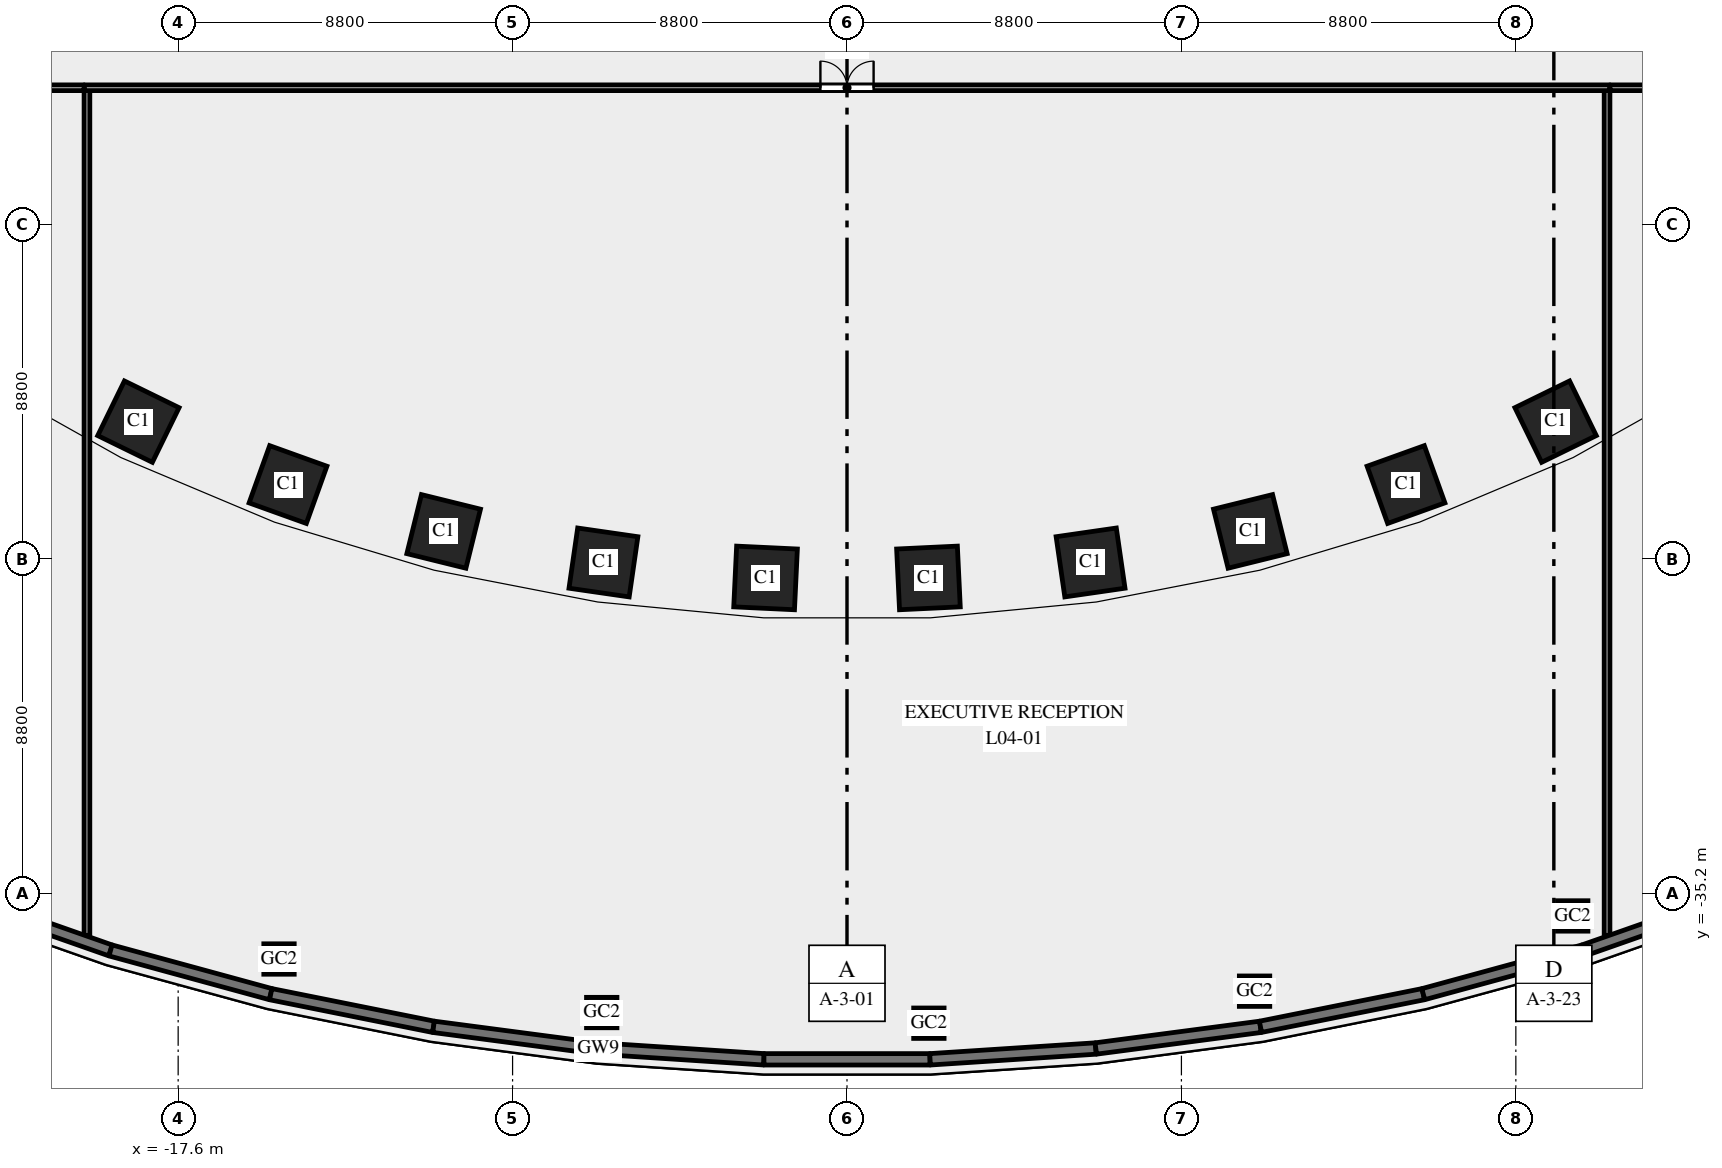
"""IFC4 building model, lengths in metres.
Left out: names, types, materials, properties, quantities, classifications, styles, units other than length and angle.
Written with IfcOpenShell. Run it as: python <this file> out.ifc"""

import sys

from ifc_helpers import new_model, si_unit, direction, frame, frame_2d, origin, origin_2d, place, context, subcontext, project, spatial, rectangle, hollow_rectangle, extrude, element, fill, save


model = new_model("IFC4")
c1 = context("Model", 3, precision=1e-05, world=origin(), true_north=direction((0.0, 1.0)))
c2 = subcontext(c1, "Body", "Model", "MODEL_VIEW")
j1 = project(units=[si_unit("LENGTHUNIT", "METRE"), si_unit("PLANEANGLEUNIT", "RADIAN")], contexts=[c1])
p1 = place(None, origin())
s1 = spatial("IfcSite", under=j1, at=p1, CompositionType="ELEMENT")
p2 = place(p1, origin())
s2 = spatial("IfcBuilding", under=s1, at=p2, CompositionType="ELEMENT")
p3 = place(p2, frame((0.0, 0.0, 25.0)))
s3 = spatial("IfcBuildingStorey", under=s2, at=p3, CompositionType="ELEMENT", Elevation=25.0)
for number, where, z_axis, x_axis in (
    (1, (-18.646, -22.785, 0.0), (0.0, 0.0, 1.0), (0.898, -0.439, 0.0)),
    (2, (-14.709, -24.441, 0.0), (0.0, 0.0, 1.0), (0.941, -0.338, 0.0)),
    (3, (-10.613, -25.674, 0.0), (0.0, 0.0, 1.0), (0.971, -0.24, 0.0)),
    (4, (-6.409, -26.491, 0.0), (0.0, 0.0, 1.0), (0.99, -0.143, 0.0)),
    (5, (-2.143, -26.898, 0.0), (0.0, 0.0, 1.0), (0.999, -0.048, 0.0)),
    (6, (2.143, -26.898, 0.0), (0.0, 0.0, 1.0), (0.999, 0.048, 0.0)),
    (7, (6.409, -26.491, 0.0), (0.0, 0.0, 1.0), (0.99, 0.143, 0.0)),
    (8, (10.613, -25.674, 0.0), (0.0, 0.0, 1.0), (0.971, 0.24, 0.0)),
    (9, (14.709, -24.441, 0.0), (0.0, 0.0, 1.0), (0.941, 0.338, 0.0)),
    (10, (18.646, -22.785, 0.0), (0.0, 0.0, 1.0), (0.898, 0.439, 0.0)),
):
    element("IfcColumn", number, at=place(p3, frame(where, z_axis=z_axis, x_axis=x_axis)), inside=s3, PredefinedType="COLUMN", context=c2, shape_type="SweptSolid", body=[
        extrude(rectangle(XDim=1.6, YDim=1.6, at=origin_2d()), origin(), (0.0, 0.0, 1.0), 5.5),
    ])
for number, where, z_axis, x_axis in (
    (11, (-14.946, -36.925, 0.0), (0.0, 0.0, 1.0), (1.0, 0.0, 0.0)),
    (12, (-6.454, -38.333, 0.0), (0.0, 0.0, 1.0), (1.0, 0.0, 0.0)),
    (13, (2.155, -38.614, 0.0), (0.0, 0.0, 1.0), (1.0, 0.0, 0.0)),
    (14, (10.725, -37.771, 0.0), (0.0, 0.0, 1.0), (1.0, 0.0, 0.0)),
    (15, (19.097, -35.792, 0.0), (0.0, 0.0, 1.0), (1.0, 0.0, 0.0)),
):
    element("IfcColumn", number, at=place(p3, frame(where, z_axis=z_axis, x_axis=x_axis)), inside=s3, PredefinedType="COLUMN", context=c2, shape_type="SweptSolid", body=[
        extrude(hollow_rectangle(XDim=0.8, YDim=0.8, WallThickness=0.04, at=origin_2d()), origin(), (0.0, 0.0, 1.0), 5.488),
    ])
p4 = place(p3, frame((20.0, -14.075, 0.0), z_axis=(0.0, 0.0, 1.0), x_axis=(0.0, -1.0, 0.0)))
e16 = element("IfcWall", 16, at=p4, inside=s3, PredefinedType="PARTITIONING", context=c2, shape_type="SweptSolid", body=[
    extrude(rectangle(XDim=22.228, YDim=0.15, at=frame_2d((11.114, 0.0))), origin(), (0.0, 0.0, 1.0), 4.2),
])
p5 = place(p3, frame((-20.0, -36.302, 0.0), z_axis=(0.0, 0.0, 1.0), x_axis=(0.0, 1.0, 0.0)))
e17 = element("IfcWall", 17, at=p5, inside=s3, PredefinedType="PARTITIONING", context=c2, shape_type="SweptSolid", body=[
    extrude(rectangle(XDim=22.228, YDim=0.15, at=frame_2d((11.114, 0.0))), origin(), (0.0, 0.0, 1.0), 4.15),
])
p6 = place(p3, frame((-20.075, -14.0, 0.0), z_axis=(0.0, 0.0, 1.0), x_axis=(1.0, 0.0, 0.0)))
e18 = element("IfcWall", 18, at=p6, inside=s3, PredefinedType="PARTITIONING", context=c2, shape_type="SweptSolid", body=[
    extrude(rectangle(XDim=40.15, YDim=0.15, at=frame_2d((20.075, 0.0))), origin(), (0.0, 0.0, 1.0), 4.15),
])
p7 = place(p6, frame((19.375, 0.0, 0.0)))
e19 = element("IfcOpeningElement", 19, at=p7, cuts=e18, PredefinedType="OPENING", context=c2, shape_type="SweptSolid", body=[
    extrude(rectangle(XDim=1.4, YDim=2.1, at=frame_2d((0.7, 1.05))), frame((0.0, 0.085, 0.0), z_axis=(0.0, -1.0, 0.0), x_axis=(1.0, 0.0, 0.0)), (0.0, 0.0, 1.0), 0.17),
])
p8 = place(p3, frame((20.075, -14.0, 0.0), z_axis=(0.0, 0.0, 1.0), x_axis=(1.0, 0.0, 0.0)))
e20 = element("IfcWall", 20, at=p8, inside=s3, PredefinedType="PARTITIONING", context=c2, shape_type="SweptSolid", body=[
    extrude(rectangle(XDim=13.85, YDim=0.15, at=frame_2d((6.925, 0.0))), origin(), (0.0, 0.0, 1.0), 4.15),
])
p9 = place(p3, frame((-47.997, -14.0, 0.0), z_axis=(0.0, 0.0, 1.0), x_axis=(1.0, 0.0, 0.0)))
e21 = element("IfcWall", 21, at=p9, inside=s3, PredefinedType="PARTITIONING", context=c2, shape_type="SweptSolid", body=[
    extrude(rectangle(XDim=27.923, YDim=0.15, at=frame_2d((13.961, 0.0))), origin(), (0.0, 0.0, 1.0), 4.2),
])
p10 = place(p9, frame((13.462, 0.0, 0.0)))
e22 = element("IfcOpeningElement", 22, at=p10, cuts=e21, PredefinedType="OPENING", context=c2, shape_type="SweptSolid", body=[
    extrude(rectangle(XDim=1.0, YDim=2.1, at=frame_2d((0.5, 1.05))), frame((0.0, 0.085, 0.0), z_axis=(0.0, -1.0, 0.0), x_axis=(1.0, 0.0, 0.0)), (0.0, 0.0, 1.0), 0.17),
])
p11 = place(p3, frame((-23.5, -35.252, 0.0), z_axis=(0.0, 0.0, 1.0), x_axis=(0.943526738033, -0.331296384853, 0.0)))
e23 = element("IfcWall", 23, at=p11, inside=s3, PredefinedType="SOLIDWALL", context=c2, shape_type="SweptSolid", body=[
    extrude(rectangle(XDim=4.368, YDim=0.3, at=frame_2d((2.184, 0.0))), origin(), (0.0, 0.0, 1.0), 5.2),
])
p12 = place(p11, frame((0.984, 0.0, 1.0)))
e24 = element("IfcOpeningElement", 24, at=p12, cuts=e23, PredefinedType="OPENING", context=c2, shape_type="SweptSolid", body=[
    extrude(rectangle(XDim=2.4, YDim=3.0, at=frame_2d((1.2, 1.5))), frame((0.0, 0.16, 0.0), z_axis=(0.0, -1.0, 0.0), x_axis=(1.0, 0.0, 0.0)), (0.0, 0.0, 1.0), 0.32),
])
p13 = place(p3, frame((-19.379, -36.699, 0.0), z_axis=(0.0, 0.0, 1.0), x_axis=(0.964679950239, -0.263424739931, 0.0)))
e25 = element("IfcWall", 25, at=p13, inside=s3, PredefinedType="SOLIDWALL", context=c2, shape_type="SweptSolid", body=[
    extrude(rectangle(XDim=4.369, YDim=0.3, at=frame_2d((2.185, 0.0))), origin(), (0.0, 0.0, 1.0), 5.2),
])
p14 = place(p13, frame((0.985, 0.0, 1.0)))
e26 = element("IfcOpeningElement", 26, at=p14, cuts=e25, PredefinedType="OPENING", context=c2, shape_type="SweptSolid", body=[
    extrude(rectangle(XDim=2.4, YDim=3.0, at=frame_2d((1.2, 1.5))), frame((0.0, 0.16, 0.0), z_axis=(0.0, -1.0, 0.0), x_axis=(1.0, 0.0, 0.0)), (0.0, 0.0, 1.0), 0.32),
])
p15 = place(p3, frame((-15.165, -37.85, 0.0), z_axis=(0.0, 0.0, 1.0), x_axis=(0.980494629762, -0.196545875071, 0.0)))
e27 = element("IfcWall", 27, at=p15, inside=s3, PredefinedType="SOLIDWALL", context=c2, shape_type="SweptSolid", body=[
    extrude(rectangle(XDim=4.37, YDim=0.3, at=frame_2d((2.185, 0.0))), origin(), (0.0, 0.0, 1.0), 5.2),
])
p16 = place(p15, frame((0.985, 0.0, 1.0)))
e28 = element("IfcOpeningElement", 28, at=p16, cuts=e27, PredefinedType="OPENING", context=c2, shape_type="SweptSolid", body=[
    extrude(rectangle(XDim=2.4, YDim=3.0, at=frame_2d((1.2, 1.5))), frame((0.0, 0.16, 0.0), z_axis=(0.0, -1.0, 0.0), x_axis=(1.0, 0.0, 0.0)), (0.0, 0.0, 1.0), 0.32),
])
p17 = place(p3, frame((-10.88, -38.709, 0.0), z_axis=(0.0, 0.0, 1.0), x_axis=(0.991441741932, -0.130549884544, 0.0)))
e29 = element("IfcWall", 29, at=p17, inside=s3, PredefinedType="SOLIDWALL", context=c2, shape_type="SweptSolid", body=[
    extrude(rectangle(XDim=4.37, YDim=0.3, at=frame_2d((2.185, 0.0))), origin(), (0.0, 0.0, 1.0), 5.2),
])
p18 = place(p17, frame((0.985, 0.0, 1.0)))
e30 = element("IfcOpeningElement", 30, at=p18, cuts=e29, PredefinedType="OPENING", context=c2, shape_type="SweptSolid", body=[
    extrude(rectangle(XDim=2.4, YDim=3.0, at=frame_2d((1.2, 1.5))), frame((0.0, 0.16, 0.0), z_axis=(0.0, -1.0, 0.0), x_axis=(1.0, 0.0, 0.0)), (0.0, 0.0, 1.0), 0.32),
])
p19 = place(p3, frame((-6.547, -39.28, 0.0), z_axis=(0.0, 0.0, 1.0), x_axis=(0.997876871627, -0.065128711577, 0.0)))
e31 = element("IfcWall", 31, at=p19, inside=s3, PredefinedType="SOLIDWALL", context=c2, shape_type="SweptSolid", body=[
    extrude(rectangle(XDim=4.371, YDim=0.3, at=frame_2d((2.186, 0.0))), origin(), (0.0, 0.0, 1.0), 5.2),
])
p20 = place(p19, frame((0.985, 0.0, 1.0)))
e32 = element("IfcOpeningElement", 32, at=p20, cuts=e31, PredefinedType="OPENING", context=c2, shape_type="SweptSolid", body=[
    extrude(rectangle(XDim=2.4, YDim=3.0, at=frame_2d((1.2, 1.5))), frame((0.0, 0.16, 0.0), z_axis=(0.0, -1.0, 0.0), x_axis=(1.0, 0.0, 0.0)), (0.0, 0.0, 1.0), 0.32),
])
p21 = place(p3, frame((-2.186, -39.564, 0.0), z_axis=(0.0, 0.0, 1.0), x_axis=(1.0, 0.0, 0.0)))
e33 = element("IfcWall", 33, at=p21, inside=s3, PredefinedType="SOLIDWALL", context=c2, shape_type="SweptSolid", body=[
    extrude(rectangle(XDim=4.371, YDim=0.3, at=frame_2d((2.186, 0.0))), origin(), (0.0, 0.0, 1.0), 5.2),
])
p22 = place(p21, frame((0.986, 0.0, 1.0)))
e34 = element("IfcOpeningElement", 34, at=p22, cuts=e33, PredefinedType="OPENING", context=c2, shape_type="SweptSolid", body=[
    extrude(rectangle(XDim=2.4, YDim=3.0, at=frame_2d((1.2, 1.5))), frame((0.0, 0.16, 0.0), z_axis=(0.0, -1.0, 0.0), x_axis=(1.0, 0.0, 0.0)), (0.0, 0.0, 1.0), 0.32),
])
p23 = place(p3, frame((2.186, -39.564, 0.0), z_axis=(0.0, 0.0, 1.0), x_axis=(0.997876871627, 0.065128711577, 0.0)))
e35 = element("IfcWall", 35, at=p23, inside=s3, PredefinedType="SOLIDWALL", context=c2, shape_type="SweptSolid", body=[
    extrude(rectangle(XDim=4.371, YDim=0.3, at=frame_2d((2.186, 0.0))), origin(), (0.0, 0.0, 1.0), 5.2),
])
p24 = place(p23, frame((0.985, 0.0, 1.0)))
e36 = element("IfcOpeningElement", 36, at=p24, cuts=e35, PredefinedType="OPENING", context=c2, shape_type="SweptSolid", body=[
    extrude(rectangle(XDim=2.4, YDim=3.0, at=frame_2d((1.2, 1.5))), frame((0.0, 0.16, 0.0), z_axis=(0.0, -1.0, 0.0), x_axis=(1.0, 0.0, 0.0)), (0.0, 0.0, 1.0), 0.32),
])
p25 = place(p3, frame((6.547, -39.28, 0.0), z_axis=(0.0, 0.0, 1.0), x_axis=(0.991441741932, 0.130549884544, 0.0)))
e37 = element("IfcWall", 37, at=p25, inside=s3, PredefinedType="SOLIDWALL", context=c2, shape_type="SweptSolid", body=[
    extrude(rectangle(XDim=4.37, YDim=0.3, at=frame_2d((2.185, 0.0))), origin(), (0.0, 0.0, 1.0), 5.2),
])
p26 = place(p25, frame((0.985, 0.0, 1.0)))
e38 = element("IfcOpeningElement", 38, at=p26, cuts=e37, PredefinedType="OPENING", context=c2, shape_type="SweptSolid", body=[
    extrude(rectangle(XDim=2.4, YDim=3.0, at=frame_2d((1.2, 1.5))), frame((0.0, 0.16, 0.0), z_axis=(0.0, -1.0, 0.0), x_axis=(1.0, 0.0, 0.0)), (0.0, 0.0, 1.0), 0.32),
])
p27 = place(p3, frame((10.88, -38.709, 0.0), z_axis=(0.0, 0.0, 1.0), x_axis=(0.980494629762, 0.196545875071, 0.0)))
e39 = element("IfcWall", 39, at=p27, inside=s3, PredefinedType="SOLIDWALL", context=c2, shape_type="SweptSolid", body=[
    extrude(rectangle(XDim=4.37, YDim=0.3, at=frame_2d((2.185, 0.0))), origin(), (0.0, 0.0, 1.0), 5.2),
])
p28 = place(p27, frame((0.985, 0.0, 1.0)))
e40 = element("IfcOpeningElement", 40, at=p28, cuts=e39, PredefinedType="OPENING", context=c2, shape_type="SweptSolid", body=[
    extrude(rectangle(XDim=2.4, YDim=3.0, at=frame_2d((1.2, 1.5))), frame((0.0, 0.16, 0.0), z_axis=(0.0, -1.0, 0.0), x_axis=(1.0, 0.0, 0.0)), (0.0, 0.0, 1.0), 0.32),
])
p29 = place(p3, frame((15.165, -37.85, 0.0), z_axis=(0.0, 0.0, 1.0), x_axis=(0.964679950239, 0.263424739931, 0.0)))
e41 = element("IfcWall", 41, at=p29, inside=s3, PredefinedType="SOLIDWALL", context=c2, shape_type="SweptSolid", body=[
    extrude(rectangle(XDim=4.369, YDim=0.3, at=frame_2d((2.185, 0.0))), origin(), (0.0, 0.0, 1.0), 5.2),
])
p30 = place(p29, frame((0.985, 0.0, 1.0)))
e42 = element("IfcOpeningElement", 42, at=p30, cuts=e41, PredefinedType="OPENING", context=c2, shape_type="SweptSolid", body=[
    extrude(rectangle(XDim=2.4, YDim=3.0, at=frame_2d((1.2, 1.5))), frame((0.0, 0.16, 0.0), z_axis=(0.0, -1.0, 0.0), x_axis=(1.0, 0.0, 0.0)), (0.0, 0.0, 1.0), 0.32),
])
p31 = place(p3, frame((19.379, -36.699, 0.0), z_axis=(0.0, 0.0, 1.0), x_axis=(0.943526738033, 0.331296384853, 0.0)))
e43 = element("IfcWall", 43, at=p31, inside=s3, PredefinedType="SOLIDWALL", context=c2, shape_type="SweptSolid", body=[
    extrude(rectangle(XDim=4.368, YDim=0.3, at=frame_2d((2.184, 0.0))), origin(), (0.0, 0.0, 1.0), 5.2),
])
p32 = place(p31, frame((0.984, 0.0, 1.0)))
e44 = element("IfcOpeningElement", 44, at=p32, cuts=e43, PredefinedType="OPENING", context=c2, shape_type="SweptSolid", body=[
    extrude(rectangle(XDim=2.4, YDim=3.0, at=frame_2d((1.2, 1.5))), frame((0.0, 0.16, 0.0), z_axis=(0.0, -1.0, 0.0), x_axis=(1.0, 0.0, 0.0)), (0.0, 0.0, 1.0), 0.32),
])
p33 = place(p7, origin())
e45 = element("IfcDoor", 45, at=p33, inside=s3, OperationType="DOUBLE_DOOR_SINGLE_SWING", PredefinedType="DOOR", context=c2, shape_type="SweptSolid", body=[
    extrude(rectangle(XDim=1.4, YDim=2.1, at=frame_2d((0.7, 1.05))), frame((0.0, 0.025, 0.0), z_axis=(0.0, -1.0, 0.0), x_axis=(1.0, 0.0, 0.0)), (0.0, 0.0, 1.0), 0.05),
])
fill(e19, e45)
p34 = place(p12, origin())
e46 = element("IfcWindow", 46, at=p34, inside=s3, PartitioningType="SINGLE_PANEL", PredefinedType="WINDOW", context=c2, shape_type="SweptSolid", body=[
    extrude(rectangle(XDim=2.4, YDim=3.0, at=frame_2d((1.2, 1.5))), frame((0.0, 0.03, 0.0), z_axis=(0.0, -1.0, 0.0), x_axis=(1.0, 0.0, 0.0)), (0.0, 0.0, 1.0), 0.06),
])
fill(e24, e46)
p35 = place(p14, origin())
e47 = element("IfcWindow", 47, at=p35, inside=s3, PartitioningType="SINGLE_PANEL", PredefinedType="WINDOW", context=c2, shape_type="SweptSolid", body=[
    extrude(rectangle(XDim=2.4, YDim=3.0, at=frame_2d((1.2, 1.5))), frame((0.0, 0.03, 0.0), z_axis=(0.0, -1.0, 0.0), x_axis=(1.0, 0.0, 0.0)), (0.0, 0.0, 1.0), 0.06),
])
fill(e26, e47)
p36 = place(p16, origin())
e48 = element("IfcWindow", 48, at=p36, inside=s3, PartitioningType="SINGLE_PANEL", PredefinedType="WINDOW", context=c2, shape_type="SweptSolid", body=[
    extrude(rectangle(XDim=2.4, YDim=3.0, at=frame_2d((1.2, 1.5))), frame((0.0, 0.03, 0.0), z_axis=(0.0, -1.0, 0.0), x_axis=(1.0, 0.0, 0.0)), (0.0, 0.0, 1.0), 0.06),
])
fill(e28, e48)
p37 = place(p18, origin())
e49 = element("IfcWindow", 49, at=p37, inside=s3, PartitioningType="SINGLE_PANEL", PredefinedType="WINDOW", context=c2, shape_type="SweptSolid", body=[
    extrude(rectangle(XDim=2.4, YDim=3.0, at=frame_2d((1.2, 1.5))), frame((0.0, 0.03, 0.0), z_axis=(0.0, -1.0, 0.0), x_axis=(1.0, 0.0, 0.0)), (0.0, 0.0, 1.0), 0.06),
])
fill(e30, e49)
p38 = place(p20, origin())
e50 = element("IfcWindow", 50, at=p38, inside=s3, PartitioningType="SINGLE_PANEL", PredefinedType="WINDOW", context=c2, shape_type="SweptSolid", body=[
    extrude(rectangle(XDim=2.4, YDim=3.0, at=frame_2d((1.2, 1.5))), frame((0.0, 0.03, 0.0), z_axis=(0.0, -1.0, 0.0), x_axis=(1.0, 0.0, 0.0)), (0.0, 0.0, 1.0), 0.06),
])
fill(e32, e50)
p39 = place(p22, origin())
e51 = element("IfcWindow", 51, at=p39, inside=s3, PartitioningType="SINGLE_PANEL", PredefinedType="WINDOW", context=c2, shape_type="SweptSolid", body=[
    extrude(rectangle(XDim=2.4, YDim=3.0, at=frame_2d((1.2, 1.5))), frame((0.0, 0.03, 0.0), z_axis=(0.0, -1.0, 0.0), x_axis=(1.0, 0.0, 0.0)), (0.0, 0.0, 1.0), 0.06),
])
fill(e34, e51)
p40 = place(p24, origin())
e52 = element("IfcWindow", 52, at=p40, inside=s3, PartitioningType="SINGLE_PANEL", PredefinedType="WINDOW", context=c2, shape_type="SweptSolid", body=[
    extrude(rectangle(XDim=2.4, YDim=3.0, at=frame_2d((1.2, 1.5))), frame((0.0, 0.03, 0.0), z_axis=(0.0, -1.0, 0.0), x_axis=(1.0, 0.0, 0.0)), (0.0, 0.0, 1.0), 0.06),
])
fill(e36, e52)
p41 = place(p26, origin())
e53 = element("IfcWindow", 53, at=p41, inside=s3, PartitioningType="SINGLE_PANEL", PredefinedType="WINDOW", context=c2, shape_type="SweptSolid", body=[
    extrude(rectangle(XDim=2.4, YDim=3.0, at=frame_2d((1.2, 1.5))), frame((0.0, 0.03, 0.0), z_axis=(0.0, -1.0, 0.0), x_axis=(1.0, 0.0, 0.0)), (0.0, 0.0, 1.0), 0.06),
])
fill(e38, e53)
p42 = place(p28, origin())
e54 = element("IfcWindow", 54, at=p42, inside=s3, PartitioningType="SINGLE_PANEL", PredefinedType="WINDOW", context=c2, shape_type="SweptSolid", body=[
    extrude(rectangle(XDim=2.4, YDim=3.0, at=frame_2d((1.2, 1.5))), frame((0.0, 0.03, 0.0), z_axis=(0.0, -1.0, 0.0), x_axis=(1.0, 0.0, 0.0)), (0.0, 0.0, 1.0), 0.06),
])
fill(e40, e54)
p43 = place(p30, origin())
e55 = element("IfcWindow", 55, at=p43, inside=s3, PartitioningType="SINGLE_PANEL", PredefinedType="WINDOW", context=c2, shape_type="SweptSolid", body=[
    extrude(rectangle(XDim=2.4, YDim=3.0, at=frame_2d((1.2, 1.5))), frame((0.0, 0.03, 0.0), z_axis=(0.0, -1.0, 0.0), x_axis=(1.0, 0.0, 0.0)), (0.0, 0.0, 1.0), 0.06),
])
fill(e42, e55)
p44 = place(p32, origin())
e56 = element("IfcWindow", 56, at=p44, inside=s3, PartitioningType="SINGLE_PANEL", PredefinedType="WINDOW", context=c2, shape_type="SweptSolid", body=[
    extrude(rectangle(XDim=2.4, YDim=3.0, at=frame_2d((1.2, 1.5))), frame((0.0, 0.03, 0.0), z_axis=(0.0, -1.0, 0.0), x_axis=(1.0, 0.0, 0.0)), (0.0, 0.0, 1.0), 0.06),
])
fill(e44, e56)
save(model, sys.argv[1])
